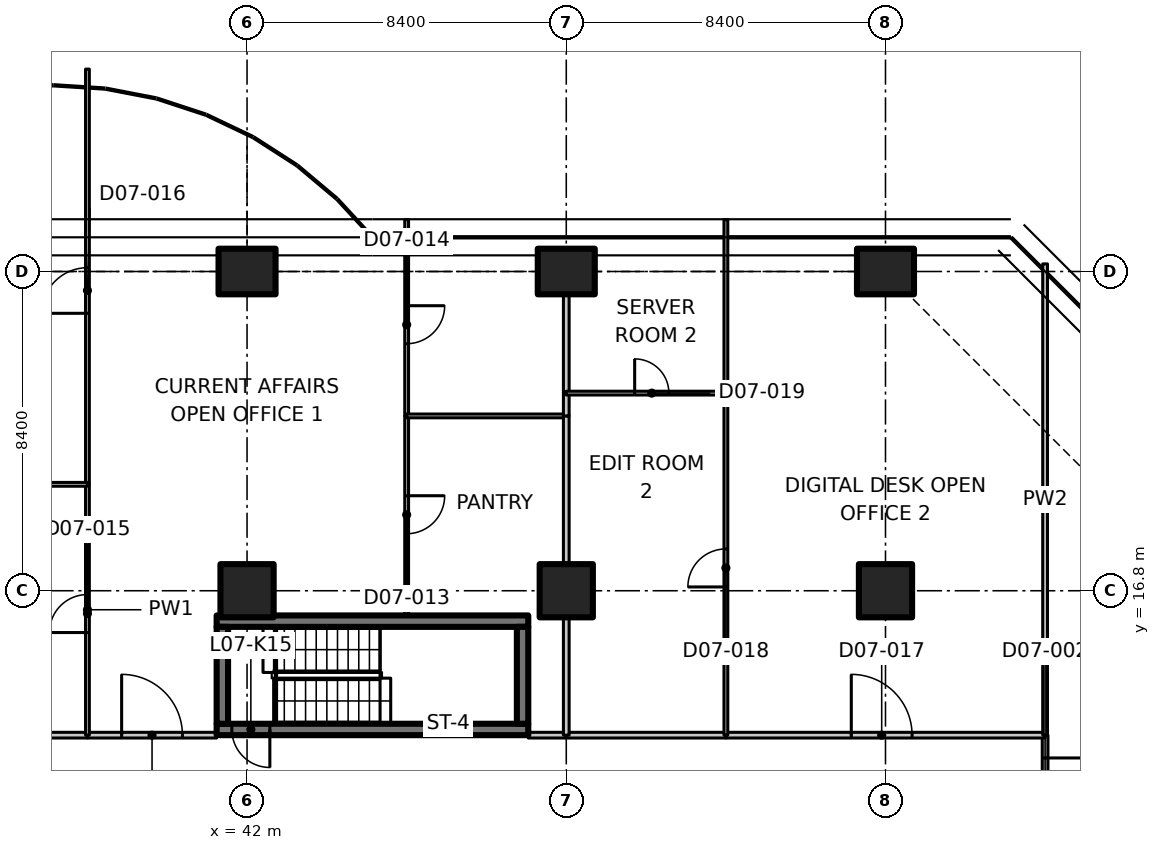
"""IFC4 building model, lengths in metres.
Left out: names, types, materials, properties, quantities, classifications, styles, units other than length and angle.
Written with IfcOpenShell. Run it as: python <this file> out.ifc"""

import sys

from ifc_helpers import new_model, si_unit, direction, frame, frame_2d, origin, origin_2d, place, context, subcontext, project, spatial, polyline, rectangle, outline, extrude, element, fill, save


model = new_model("IFC4")
c1 = context("Model", 3, precision=1e-05, world=origin(), true_north=direction((0.0, 1.0)))
c2 = subcontext(c1, "Body", "Model", "MODEL_VIEW")
j1 = project(units=[si_unit("LENGTHUNIT", "METRE"), si_unit("PLANEANGLEUNIT", "RADIAN")], contexts=[c1])
p1 = place(None, origin())
s1 = spatial("IfcSite", under=j1, at=p1, CompositionType="ELEMENT")
p2 = place(p1, origin())
s2 = spatial("IfcBuilding", under=s1, at=p2, CompositionType="ELEMENT")
p3 = place(p2, frame((0.0, 0.0, 40.1)))
s3 = spatial("IfcBuildingStorey", under=s2, at=p3, CompositionType="ELEMENT", Elevation=40.1)
p4 = place(p3, frame((42.0, 16.8, 0.0), z_axis=(0.0, 0.0, 1.0), x_axis=(1.0, 0.0, 0.0)))
e1 = element("IfcColumn", 1, at=p4, inside=s3, PredefinedType="COLUMN", context=c2, shape_type="SweptSolid", body=[
    extrude(rectangle(XDim=1.4, YDim=1.4, at=origin_2d()), origin(), (0.0, 0.0, 1.0), 3.35),
])
p5 = place(p3, frame((42.0, 25.2, 0.0), z_axis=(0.0, 0.0, 1.0), x_axis=(0.0, 1.0, 0.0)))
e2 = element("IfcColumn", 2, at=p5, inside=s3, PredefinedType="COLUMN", context=c2, shape_type="SweptSolid", body=[
    extrude(rectangle(XDim=1.2, YDim=1.5, at=origin_2d()), origin(), (0.0, 0.0, 1.0), 3.35),
])
p6 = place(p3, frame((50.4, 16.8, 0.0), z_axis=(0.0, 0.0, 1.0), x_axis=(1.0, 0.0, 0.0)))
e3 = element("IfcColumn", 3, at=p6, inside=s3, PredefinedType="COLUMN", context=c2, shape_type="SweptSolid", body=[
    extrude(rectangle(XDim=1.4, YDim=1.4, at=origin_2d()), origin(), (0.0, 0.0, 1.0), 3.35),
])
p7 = place(p3, frame((50.4, 25.2, 0.0), z_axis=(0.0, 0.0, 1.0), x_axis=(0.0, 1.0, 0.0)))
e4 = element("IfcColumn", 4, at=p7, inside=s3, PredefinedType="COLUMN", context=c2, shape_type="SweptSolid", body=[
    extrude(rectangle(XDim=1.2, YDim=1.5, at=origin_2d()), origin(), (0.0, 0.0, 1.0), 3.35),
])
p8 = place(p3, frame((58.8, 16.8, 0.0), z_axis=(0.0, 0.0, 1.0), x_axis=(1.0, 0.0, 0.0)))
e5 = element("IfcColumn", 5, at=p8, inside=s3, PredefinedType="COLUMN", context=c2, shape_type="SweptSolid", body=[
    extrude(rectangle(XDim=1.4, YDim=1.4, at=origin_2d()), origin(), (0.0, 0.0, 1.0), 3.35),
])
p9 = place(p3, frame((58.8, 25.2, 0.0), z_axis=(0.0, 0.0, 1.0), x_axis=(0.0, 1.0, 0.0)))
e6 = element("IfcColumn", 6, at=p9, inside=s3, PredefinedType="COLUMN", context=c2, shape_type="SweptSolid", body=[
    extrude(rectangle(XDim=1.2, YDim=1.5, at=origin_2d()), origin(), (0.0, 0.0, 1.0), 3.35),
])
p10 = place(p3, frame((49.4, 13.15, 0.0), z_axis=(0.0, 0.0, 1.0), x_axis=(-1.0, 0.0, 0.0)))
e7 = element("IfcWall", 7, at=p10, inside=s3, PredefinedType="SHEAR", context=c2, shape_type="SweptSolid", body=[
    extrude(rectangle(XDim=8.2, YDim=0.3, at=frame_2d((4.1, 0.0))), origin(), (0.0, 0.0, 1.0), 3.35),
])
p11 = place(p10, frame((6.8, 0.0, 0.0)))
e8 = element("IfcOpeningElement", 8, at=p11, cuts=e7, PredefinedType="OPENING", context=c2, shape_type="SweptSolid", body=[
    extrude(rectangle(XDim=1.0, YDim=2.1, at=frame_2d((0.5, 1.05))), frame((0.0, 0.16, 0.0), z_axis=(0.0, -1.0, 0.0), x_axis=(1.0, 0.0, 0.0)), (0.0, 0.0, 1.0), 0.32),
])
p12 = place(p3, frame((41.2, 16.0, 0.0), z_axis=(0.0, 0.0, 1.0), x_axis=(1.0, 0.0, 0.0)))
e9 = element("IfcWall", 9, at=p12, inside=s3, PredefinedType="SHEAR", context=c2, shape_type="SweptSolid", body=[
    extrude(rectangle(XDim=8.2, YDim=0.3, at=frame_2d((4.1, 0.0))), origin(), (0.0, 0.0, 1.0), 3.35),
])
for number, where, z_axis, x_axis in (
    (10, (41.35, 13.3, 0.0), (0.0, 0.0, 1.0), (0.0, 1.0, 0.0)),
    (11, (49.25, 13.3, 0.0), (0.0, 0.0, 1.0), (0.0, 1.0, 0.0)),
):
    element("IfcWall", number, at=place(p3, frame(where, z_axis=z_axis, x_axis=x_axis)), inside=s3, PredefinedType="SHEAR", context=c2, shape_type="SweptSolid", body=[
        extrude(rectangle(XDim=2.55, YDim=0.3, at=frame_2d((1.275, 0.0))), origin(), (0.0, 0.0, 1.0), 3.35),
    ])
p13 = place(p3, frame((63.0, 13.0, 0.0), z_axis=(0.0, 0.0, 1.0), x_axis=(0.0, -1.0, 0.0)))
e12 = element("IfcWall", 12, at=p13, inside=s3, PredefinedType="PARTITIONING", context=c2, shape_type="SweptSolid", body=[
    extrude(rectangle(XDim=3.4, YDim=0.15, at=frame_2d((1.7, 0.0))), origin(), (0.0, 0.0, 1.0), 3.33),
])
p14 = place(p13, frame((0.6, 0.0, 0.0)))
e13 = element("IfcOpeningElement", 13, at=p14, cuts=e12, PredefinedType="OPENING", context=c2, shape_type="SweptSolid", body=[
    extrude(rectangle(XDim=2.0, YDim=2.4, at=frame_2d((1.0, 1.2))), frame((0.0, 0.085, 0.0), z_axis=(0.0, -1.0, 0.0), x_axis=(1.0, 0.0, 0.0)), (0.0, 0.0, 1.0), 0.17),
])
p15 = place(p3, frame((37.8, 13.0, 0.0), z_axis=(0.0, 0.0, 1.0), x_axis=(1.0, 0.0, 0.0)))
e14 = element("IfcWall", 14, at=p15, inside=s3, PredefinedType="PARTITIONING", context=c2, shape_type="SweptSolid", body=[
    extrude(rectangle(XDim=3.4, YDim=0.15, at=frame_2d((1.7, 0.0))), origin(), (0.0, 0.0, 1.0), 3.33),
])
p16 = place(p15, frame((0.9, 0.0, 0.0)))
e15 = element("IfcOpeningElement", 15, at=p16, cuts=e14, PredefinedType="OPENING", context=c2, shape_type="SweptSolid", body=[
    extrude(rectangle(XDim=1.6, YDim=2.1, at=frame_2d((0.8, 1.05))), frame((0.0, 0.085, 0.0), z_axis=(0.0, -1.0, 0.0), x_axis=(1.0, 0.0, 0.0)), (0.0, 0.0, 1.0), 0.17),
])
p17 = place(p3, frame((49.4, 13.0, 0.0), z_axis=(0.0, 0.0, 1.0), x_axis=(1.0, 0.0, 0.0)))
e16 = element("IfcWall", 16, at=p17, inside=s3, PredefinedType="PARTITIONING", context=c2, shape_type="SweptSolid", body=[
    extrude(rectangle(XDim=1.0, YDim=0.15, at=frame_2d((0.5, 0.0))), origin(), (0.0, 0.0, 1.0), 3.33),
])
p18 = place(p3, frame((33.6, 13.0, 0.0), z_axis=(0.0, 0.0, 1.0), x_axis=(1.0, 0.0, 0.0)))
e17 = element("IfcWall", 17, at=p18, inside=s3, PredefinedType="PARTITIONING", context=c2, shape_type="SweptSolid", body=[
    extrude(rectangle(XDim=4.2, YDim=0.15, at=frame_2d((2.1, 0.0))), origin(), (0.0, 0.0, 1.0), 3.33),
])
p19 = place(p3, frame((54.6, 13.0, 0.0), z_axis=(0.0, 0.0, 1.0), x_axis=(1.0, 0.0, 0.0)))
e18 = element("IfcWall", 18, at=p19, inside=s3, PredefinedType="PARTITIONING", context=c2, shape_type="SweptSolid", body=[
    extrude(rectangle(XDim=8.4, YDim=0.15, at=frame_2d((4.2, 0.0))), origin(), (0.0, 0.0, 1.0), 3.33),
])
p20 = place(p19, frame((3.3, 0.0, 0.0)))
e19 = element("IfcOpeningElement", 19, at=p20, cuts=e18, PredefinedType="OPENING", context=c2, shape_type="SweptSolid", body=[
    extrude(rectangle(XDim=1.6, YDim=2.1, at=frame_2d((0.8, 1.05))), frame((0.0, 0.085, 0.0), z_axis=(0.0, -1.0, 0.0), x_axis=(1.0, 0.0, 0.0)), (0.0, 0.0, 1.0), 0.17),
])
p21 = place(p3, frame((50.4, 13.0, 0.0), z_axis=(0.0, 0.0, 1.0), x_axis=(1.0, 0.0, 0.0)))
e20 = element("IfcWall", 20, at=p21, inside=s3, PredefinedType="PARTITIONING", context=c2, shape_type="SweptSolid", body=[
    extrude(rectangle(XDim=4.2, YDim=0.15, at=frame_2d((2.1, 0.0))), origin(), (0.0, 0.0, 1.0), 3.33),
])
p22 = place(p3, frame((63.0, 13.0, 0.0), z_axis=(0.0, 0.0, 1.0), x_axis=(0.0, 1.0, 0.0)))
e21 = element("IfcWall", 21, at=p22, inside=s3, PredefinedType="PARTITIONING", context=c2, shape_type="SweptSolid", body=[
    extrude(outline(polyline([(0.0, 0.0), (12.4, 0.0), (12.4, 3.33), (8.678, 3.33), (8.676, 2.98), (7.324, 2.98), (7.322, 3.33), (0.0, 3.33), (0.0, 0.0)])), frame((0.0, 0.062, 0.0), z_axis=(0.0, -1.0, 0.0), x_axis=(1.0, 0.0, 0.0)), (0.0, 0.0, 1.0), 0.125),
])
p23 = place(p3, frame((46.2, 21.4, 0.0), z_axis=(0.0, 0.0, 1.0), x_axis=(0.0, -1.0, 0.0)))
e22 = element("IfcWall", 22, at=p23, inside=s3, PredefinedType="PARTITIONING", context=c2, shape_type="SweptSolid", body=[
    extrude(rectangle(XDim=5.25, YDim=0.1, at=frame_2d((2.625, 0.0))), origin(), (0.0, 0.0, 1.0), 3.33),
])
p24 = place(p23, frame((2.1, 0.0, 0.0)))
e23 = element("IfcOpeningElement", 23, at=p24, cuts=e22, PredefinedType="OPENING", context=c2, shape_type="SweptSolid", body=[
    extrude(rectangle(XDim=1.0, YDim=2.1, at=frame_2d((0.5, 1.05))), frame((0.0, 0.06, 0.0), z_axis=(0.0, -1.0, 0.0), x_axis=(1.0, 0.0, 0.0)), (0.0, 0.0, 1.0), 0.12),
])
p25 = place(p3, frame((46.2, 26.565, 0.0), z_axis=(0.0, 0.0, 1.0), x_axis=(0.0, -1.0, 0.0)))
e24 = element("IfcWall", 24, at=p25, inside=s3, PredefinedType="PARTITIONING", context=c2, shape_type="SweptSolid", body=[
    extrude(outline(polyline([(0.0, 0.0), (5.165, 0.0), (5.165, 3.33), (1.815, 3.33), (1.813, 2.98), (0.917, 2.98), (0.915, 3.33), (0.265, 3.33), (0.0, 3.33), (0.0, 0.0)])), frame((0.0, 0.05, 0.0), z_axis=(0.0, -1.0, 0.0), x_axis=(1.0, 0.0, 0.0)), (0.0, 0.0, 1.0), 0.1),
])
p26 = place(p25, frame((2.265, 0.0, 0.0)))
e25 = element("IfcOpeningElement", 25, at=p26, cuts=e24, PredefinedType="OPENING", context=c2, shape_type="SweptSolid", body=[
    extrude(rectangle(XDim=1.0, YDim=2.1, at=frame_2d((0.5, 1.05))), frame((0.0, 0.06, 0.0), z_axis=(0.0, -1.0, 0.0), x_axis=(1.0, 0.0, 0.0)), (0.0, 0.0, 1.0), 0.12),
])
p27 = place(p3, frame((37.8, 13.0, 0.0), z_axis=(0.0, 0.0, 1.0), x_axis=(0.0, 1.0, 0.0)))
e26 = element("IfcWall", 26, at=p27, inside=s3, PredefinedType="PARTITIONING", context=c2, shape_type="SweptSolid", body=[
    extrude(rectangle(XDim=6.6, YDim=0.1, at=frame_2d((3.3, 0.0))), origin(), (0.0, 0.0, 1.0), 3.33),
])
p28 = place(p27, frame((2.7, 0.0, 0.0)))
e27 = element("IfcOpeningElement", 27, at=p28, cuts=e26, PredefinedType="OPENING", context=c2, shape_type="SweptSolid", body=[
    extrude(rectangle(XDim=1.0, YDim=2.1, at=frame_2d((0.5, 1.05))), frame((0.0, 0.06, 0.0), z_axis=(0.0, -1.0, 0.0), x_axis=(1.0, 0.0, 0.0)), (0.0, 0.0, 1.0), 0.12),
])
p29 = place(p3, frame((37.8, 19.6, 0.0), z_axis=(0.0, 0.0, 1.0), x_axis=(0.0, 1.0, 0.0)))
e28 = element("IfcWall", 28, at=p29, inside=s3, PredefinedType="PARTITIONING", context=c2, shape_type="SweptSolid", body=[
    extrude(outline(polyline([(0.0, 0.0), (10.926, 0.0), (10.926, 3.33), (10.643, 3.33), (6.05, 3.33), (6.048, 2.98), (5.152, 2.98), (5.15, 3.33), (0.0, 3.33), (0.0, 0.0)])), frame((0.0, 0.05, 0.0), z_axis=(0.0, -1.0, 0.0), x_axis=(1.0, 0.0, 0.0)), (0.0, 0.0, 1.0), 0.1),
])
p30 = place(p29, frame((4.5, 0.0, 0.0)))
e29 = element("IfcOpeningElement", 29, at=p30, cuts=e28, PredefinedType="OPENING", context=c2, shape_type="SweptSolid", body=[
    extrude(rectangle(XDim=1.2, YDim=2.1, at=frame_2d((0.6, 1.05))), frame((0.0, 0.06, 0.0), z_axis=(0.0, -1.0, 0.0), x_axis=(1.0, 0.0, 0.0)), (0.0, 0.0, 1.0), 0.12),
])
p31 = place(p3, frame((46.2, 21.4, 0.0), z_axis=(0.0, 0.0, 1.0), x_axis=(1.0, 0.0, 0.0)))
e30 = element("IfcWall", 30, at=p31, inside=s3, PredefinedType="PARTITIONING", context=c2, shape_type="SweptSolid", body=[
    extrude(rectangle(XDim=4.2, YDim=0.1, at=frame_2d((2.1, 0.0))), origin(), (0.0, 0.0, 1.0), 3.33),
])
p32 = place(p3, frame((50.4, 21.4, 0.0), z_axis=(0.0, 0.0, 1.0), x_axis=(0.0, -1.0, 0.0)))
e31 = element("IfcWall", 31, at=p32, inside=s3, PredefinedType="PARTITIONING", context=c2, shape_type="SweptSolid", body=[
    extrude(rectangle(XDim=3.88, YDim=0.15, at=frame_2d((1.94, 0.0))), origin(), (0.0, 0.0, 1.0), 3.33),
])
p33 = place(p3, frame((50.4, 16.08, 0.0), z_axis=(0.0, 0.0, 1.0), x_axis=(0.0, -1.0, 0.0)))
e32 = element("IfcWall", 32, at=p33, inside=s3, PredefinedType="PARTITIONING", context=c2, shape_type="SweptSolid", body=[
    extrude(rectangle(XDim=3.08, YDim=0.15, at=frame_2d((1.54, 0.0))), origin(), (0.0, 0.0, 1.0), 3.33),
])
p34 = place(p3, frame((50.4, 22.0, 0.0), z_axis=(0.0, 0.0, 1.0), x_axis=(0.0, -1.0, 0.0)))
e33 = element("IfcWall", 33, at=p34, inside=s3, PredefinedType="PARTITIONING", context=c2, shape_type="SweptSolid", body=[
    extrude(rectangle(XDim=0.6, YDim=0.15, at=frame_2d((0.3, 0.0))), origin(), (0.0, 0.0, 1.0), 3.33),
])
p35 = place(p3, frame((50.4, 24.58, 0.0), z_axis=(0.0, 0.0, 1.0), x_axis=(0.0, -1.0, 0.0)))
e34 = element("IfcWall", 34, at=p35, inside=s3, PredefinedType="PARTITIONING", context=c2, shape_type="SweptSolid", body=[
    extrude(rectangle(XDim=2.58, YDim=0.15, at=frame_2d((1.29, 0.0))), origin(), (0.0, 0.0, 1.0), 3.33),
])
p36 = place(p3, frame((33.6, 19.6, 0.0), z_axis=(0.0, 0.0, 1.0), x_axis=(1.0, 0.0, 0.0)))
e35 = element("IfcWall", 35, at=p36, inside=s3, PredefinedType="PARTITIONING", context=c2, shape_type="SweptSolid", body=[
    extrude(rectangle(XDim=4.2, YDim=0.1, at=frame_2d((2.1, 0.0))), origin(), (0.0, 0.0, 1.0), 3.33),
])
p37 = place(p3, frame((54.6, 13.0, 0.0), z_axis=(0.0, 0.0, 1.0), x_axis=(0.0, 1.0, 0.0)))
e36 = element("IfcWall", 36, at=p37, inside=s3, PredefinedType="PARTITIONING", context=c2, shape_type="SweptSolid", body=[
    extrude(rectangle(XDim=9.0, YDim=0.1, at=frame_2d((4.5, 0.0))), origin(), (0.0, 0.0, 1.0), 3.33),
])
p38 = place(p37, frame((3.9, 0.0, 0.0)))
e37 = element("IfcOpeningElement", 37, at=p38, cuts=e36, PredefinedType="OPENING", context=c2, shape_type="SweptSolid", body=[
    extrude(rectangle(XDim=1.0, YDim=2.1, at=frame_2d((0.5, 1.05))), frame((0.0, 0.06, 0.0), z_axis=(0.0, -1.0, 0.0), x_axis=(1.0, 0.0, 0.0)), (0.0, 0.0, 1.0), 0.12),
])
p39 = place(p3, frame((54.6, 22.0, 0.0), z_axis=(0.0, 0.0, 1.0), x_axis=(0.0, 1.0, 0.0)))
e38 = element("IfcWall", 38, at=p39, inside=s3, PredefinedType="PARTITIONING", context=c2, shape_type="SweptSolid", body=[
    extrude(rectangle(XDim=4.565, YDim=0.1, at=frame_2d((2.282, 0.0))), origin(), (0.0, 0.0, 1.0), 2.98),
])
p40 = place(p3, frame((50.4, 22.0, 0.0), z_axis=(0.0, 0.0, 1.0), x_axis=(1.0, 0.0, 0.0)))
e39 = element("IfcWall", 39, at=p40, inside=s3, PredefinedType="PARTITIONING", context=c2, shape_type="SweptSolid", body=[
    extrude(rectangle(XDim=4.2, YDim=0.1, at=frame_2d((2.1, 0.0))), origin(), (0.0, 0.0, 1.0), 3.33),
])
p41 = place(p40, frame((1.8, 0.0, 0.0)))
e40 = element("IfcOpeningElement", 40, at=p41, cuts=e39, PredefinedType="OPENING", context=c2, shape_type="SweptSolid", body=[
    extrude(rectangle(XDim=0.9, YDim=2.1, at=frame_2d((0.45, 1.05))), frame((0.0, 0.06, 0.0), z_axis=(0.0, -1.0, 0.0), x_axis=(1.0, 0.0, 0.0)), (0.0, 0.0, 1.0), 0.12),
])
p42 = place(p11, origin())
e41 = element("IfcDoor", 41, at=p42, inside=s3, OperationType="SINGLE_SWING_LEFT", PredefinedType="DOOR", context=c2, shape_type="SweptSolid", body=[
    extrude(rectangle(XDim=1.0, YDim=2.1, at=frame_2d((0.5, 1.05))), frame((0.0, 0.025, 0.0), z_axis=(0.0, -1.0, 0.0), x_axis=(1.0, 0.0, 0.0)), (0.0, 0.0, 1.0), 0.05),
])
fill(e8, e41)
p43 = place(p14, origin())
e42 = element("IfcDoor", 42, at=p43, inside=s3, OperationType="DOUBLE_DOOR_SINGLE_SWING", PredefinedType="DOOR", context=c2, shape_type="SweptSolid", body=[
    extrude(rectangle(XDim=2.0, YDim=2.4, at=frame_2d((1.0, 1.2))), frame((0.0, 0.025, 0.0), z_axis=(0.0, -1.0, 0.0), x_axis=(1.0, 0.0, 0.0)), (0.0, 0.0, 1.0), 0.05),
])
fill(e13, e42)
p44 = place(p16, origin())
e43 = element("IfcDoor", 43, at=p44, inside=s3, OperationType="DOUBLE_DOOR_SINGLE_SWING", PredefinedType="DOOR", context=c2, shape_type="SweptSolid", body=[
    extrude(rectangle(XDim=1.6, YDim=2.1, at=frame_2d((0.8, 1.05))), frame((0.0, 0.025, 0.0), z_axis=(0.0, -1.0, 0.0), x_axis=(1.0, 0.0, 0.0)), (0.0, 0.0, 1.0), 0.05),
])
fill(e15, e43)
p45 = place(p24, origin())
e44 = element("IfcDoor", 44, at=p45, inside=s3, OperationType="SINGLE_SWING_LEFT", PredefinedType="DOOR", context=c2, shape_type="SweptSolid", body=[
    extrude(rectangle(XDim=1.0, YDim=2.1, at=frame_2d((0.5, 1.05))), frame((0.0, 0.025, 0.0), z_axis=(0.0, -1.0, 0.0), x_axis=(1.0, 0.0, 0.0)), (0.0, 0.0, 1.0), 0.05),
])
fill(e23, e44)
p46 = place(p26, origin())
e45 = element("IfcDoor", 45, at=p46, inside=s3, OperationType="SINGLE_SWING_LEFT", PredefinedType="DOOR", context=c2, shape_type="SweptSolid", body=[
    extrude(rectangle(XDim=1.0, YDim=2.1, at=frame_2d((0.5, 1.05))), frame((0.0, 0.025, 0.0), z_axis=(0.0, -1.0, 0.0), x_axis=(1.0, 0.0, 0.0)), (0.0, 0.0, 1.0), 0.05),
])
fill(e25, e45)
p47 = place(p28, origin())
e46 = element("IfcDoor", 46, at=p47, inside=s3, OperationType="SINGLE_SWING_LEFT", PredefinedType="DOOR", context=c2, shape_type="SweptSolid", body=[
    extrude(rectangle(XDim=1.0, YDim=2.1, at=frame_2d((0.5, 1.05))), frame((0.0, 0.025, 0.0), z_axis=(0.0, -1.0, 0.0), x_axis=(1.0, 0.0, 0.0)), (0.0, 0.0, 1.0), 0.05),
])
fill(e27, e46)
p48 = place(p30, origin())
e47 = element("IfcDoor", 47, at=p48, inside=s3, OperationType="SINGLE_SWING_LEFT", PredefinedType="DOOR", context=c2, shape_type="SweptSolid", body=[
    extrude(rectangle(XDim=1.2, YDim=2.1, at=frame_2d((0.6, 1.05))), frame((0.0, 0.025, 0.0), z_axis=(0.0, -1.0, 0.0), x_axis=(1.0, 0.0, 0.0)), (0.0, 0.0, 1.0), 0.05),
])
fill(e29, e47)
p49 = place(p20, origin())
e48 = element("IfcDoor", 48, at=p49, inside=s3, OperationType="DOUBLE_DOOR_SINGLE_SWING", PredefinedType="DOOR", context=c2, shape_type="SweptSolid", body=[
    extrude(rectangle(XDim=1.6, YDim=2.1, at=frame_2d((0.8, 1.05))), frame((0.0, 0.025, 0.0), z_axis=(0.0, -1.0, 0.0), x_axis=(1.0, 0.0, 0.0)), (0.0, 0.0, 1.0), 0.05),
])
fill(e19, e48)
p50 = place(p38, origin())
e49 = element("IfcDoor", 49, at=p50, inside=s3, OperationType="SINGLE_SWING_LEFT", PredefinedType="DOOR", context=c2, shape_type="SweptSolid", body=[
    extrude(rectangle(XDim=1.0, YDim=2.1, at=frame_2d((0.5, 1.05))), frame((0.0, 0.025, 0.0), z_axis=(0.0, -1.0, 0.0), x_axis=(1.0, 0.0, 0.0)), (0.0, 0.0, 1.0), 0.05),
])
fill(e37, e49)
p51 = place(p41, origin())
e50 = element("IfcDoor", 50, at=p51, inside=s3, OperationType="SINGLE_SWING_LEFT", PredefinedType="DOOR", context=c2, shape_type="SweptSolid", body=[
    extrude(rectangle(XDim=0.9, YDim=2.1, at=frame_2d((0.45, 1.05))), frame((0.0, 0.025, 0.0), z_axis=(0.0, -1.0, 0.0), x_axis=(1.0, 0.0, 0.0)), (0.0, 0.0, 1.0), 0.05),
])
fill(e40, e50)
save(model, sys.argv[1])
